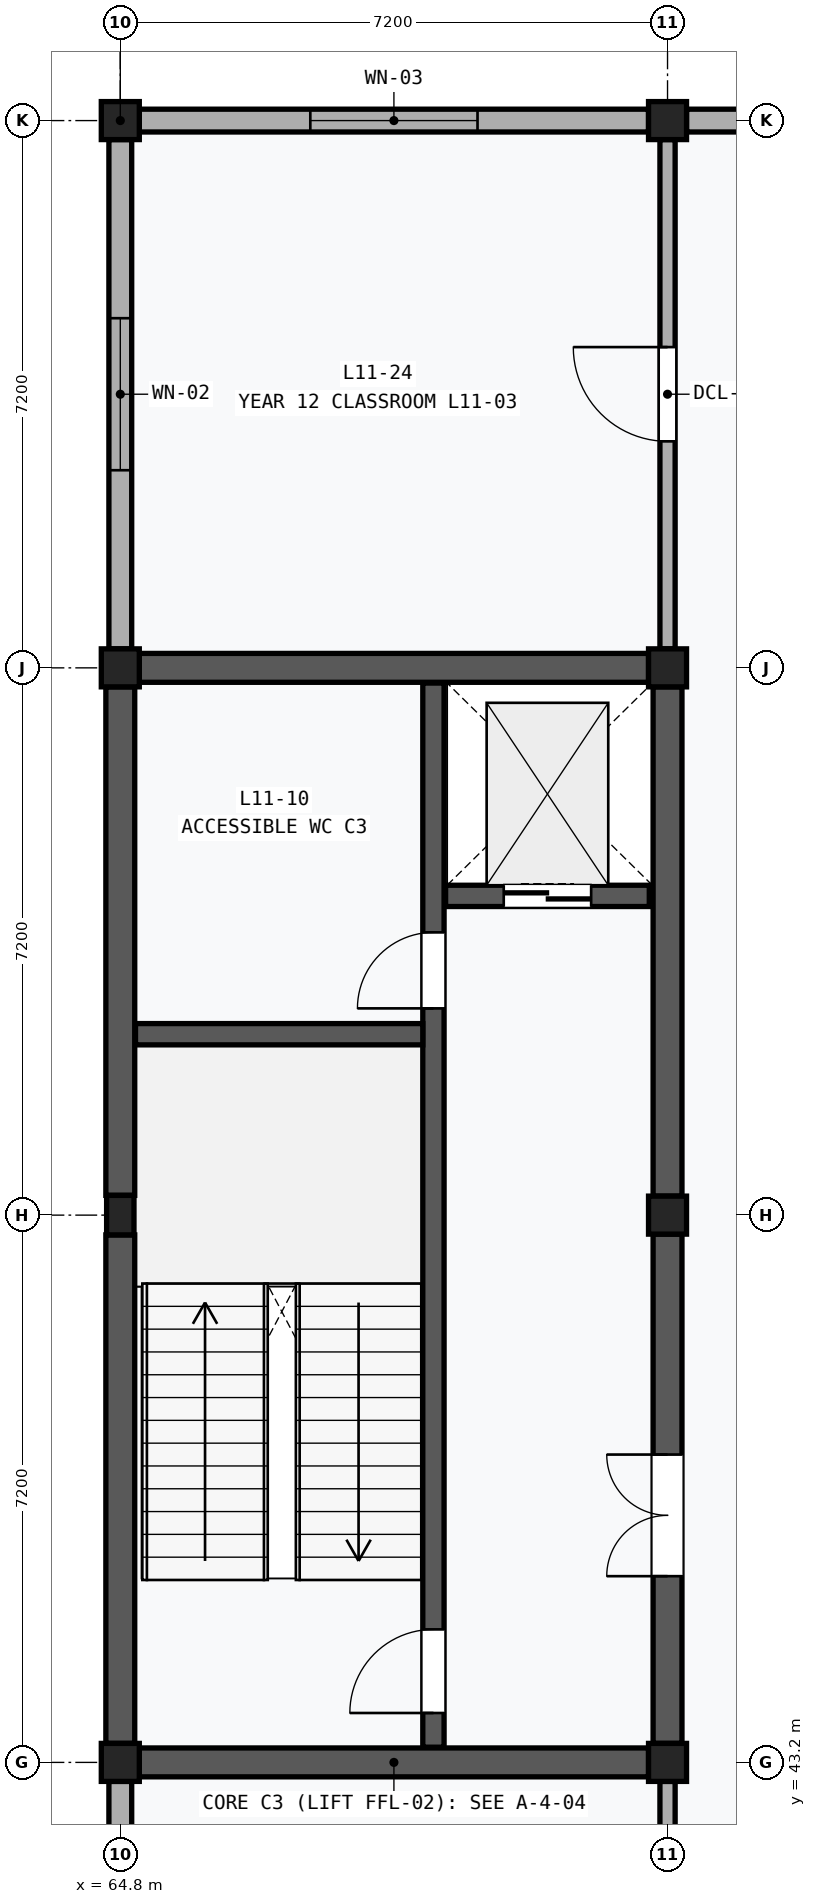
"""IFC4 building model, lengths in metres.
Left out: names, types, materials, properties, quantities, classifications, styles, units other than length and angle.
Written with IfcOpenShell. Run it as: python <this file> out.ifc"""

import sys

from ifc_helpers import new_model, si_unit, direction, frame, frame_2d, origin, origin_2d, place, context, subcontext, project, spatial, rectangle, extrude, element, fill, save


model = new_model("IFC4")
c1 = context("Model", 3, precision=1e-05, world=origin(), true_north=direction((0.0, 1.0)))
c2 = subcontext(c1, "Body", "Model", "MODEL_VIEW")
j1 = project(units=[si_unit("LENGTHUNIT", "METRE"), si_unit("PLANEANGLEUNIT", "RADIAN")], contexts=[c1])
p1 = place(None, origin())
s1 = spatial("IfcSite", under=j1, at=p1, CompositionType="ELEMENT")
p2 = place(p1, origin())
s2 = spatial("IfcBuilding", under=s1, at=p2, CompositionType="ELEMENT")
p3 = place(p2, frame((0.0, 0.0, 46.8)))
s3 = spatial("IfcBuildingStorey", under=s2, at=p3, CompositionType="ELEMENT", Elevation=46.8)
p4 = place(p3, frame((64.8, 43.2, 0.0), z_axis=(0.0, 0.0, 1.0), x_axis=(1.0, 0.0, 0.0)))
e1 = element("IfcColumn", 1, at=p4, inside=s3, PredefinedType="COLUMN", context=c2, shape_type="SweptSolid", body=[
    extrude(rectangle(XDim=0.5, YDim=0.5, at=origin_2d()), origin(), (0.0, 0.0, 1.0), 4.2),
])
p5 = place(p3, frame((64.8, 50.4, 0.0), z_axis=(0.0, 0.0, 1.0), x_axis=(1.0, 0.0, 0.0)))
e2 = element("IfcColumn", 2, at=p5, inside=s3, PredefinedType="PILASTER", context=c2, shape_type="SweptSolid", body=[
    extrude(rectangle(XDim=0.36, YDim=0.52, at=origin_2d()), origin(), (0.0, 0.0, 1.0), 4.2),
])
for number, where, z_axis, x_axis in (
    (3, (64.8, 57.6, 0.0), (0.0, 0.0, 1.0), (1.0, 0.0, 0.0)),
    (4, (64.8, 64.8, 0.0), (0.0, 0.0, 1.0), (1.0, 0.0, 0.0)),
    (5, (72.0, 43.2, 0.0), (0.0, 0.0, 1.0), (1.0, 0.0, 0.0)),
    (6, (72.0, 50.4, 0.0), (0.0, 0.0, 1.0), (1.0, 0.0, 0.0)),
    (7, (72.0, 57.6, 0.0), (0.0, 0.0, 1.0), (1.0, 0.0, 0.0)),
    (8, (72.0, 64.8, 0.0), (0.0, 0.0, 1.0), (1.0, 0.0, 0.0)),
):
    element("IfcColumn", number, at=place(p3, frame(where, z_axis=z_axis, x_axis=x_axis)), inside=s3, PredefinedType="COLUMN", context=c2, shape_type="SweptSolid", body=[
        extrude(rectangle(XDim=0.5, YDim=0.5, at=origin_2d()), origin(), (0.0, 0.0, 1.0), 4.2),
    ])
p6 = place(p3, frame((64.8, 36.25, 0.0), z_axis=(0.0, 0.0, 1.0), x_axis=(0.0, 1.0, 0.0)))
e9 = element("IfcWall", 9, at=p6, inside=s3, PredefinedType="SOLIDWALL", context=c2, shape_type="SweptSolid", body=[
    extrude(rectangle(XDim=6.7, YDim=0.3, at=frame_2d((3.35, 0.0))), origin(), (0.0, 0.0, 1.0), 3.37),
])
p7 = place(p3, frame((65.05, 64.8, 0.0), z_axis=(0.0, 0.0, 1.0), x_axis=(1.0, 0.0, 0.0)))
e10 = element("IfcWall", 10, at=p7, inside=s3, PredefinedType="SOLIDWALL", context=c2, shape_type="SweptSolid", body=[
    extrude(rectangle(XDim=6.7, YDim=0.3, at=frame_2d((3.35, 0.0))), origin(), (0.0, 0.0, 1.0), 3.37),
])
p8 = place(p7, frame((2.25, 0.0, 0.9)))
e11 = element("IfcOpeningElement", 11, at=p8, cuts=e10, PredefinedType="OPENING", context=c2, shape_type="SweptSolid", body=[
    extrude(rectangle(XDim=2.2, YDim=1.8, at=frame_2d((1.1, 0.9))), frame((0.0, 0.162, 0.0), z_axis=(0.0, -1.0, 0.0), x_axis=(1.0, 0.0, 0.0)), (0.0, 0.0, 1.0), 0.324),
])
p9 = place(p3, frame((64.8, 57.85, 0.0), z_axis=(0.0, 0.0, 1.0), x_axis=(0.0, 1.0, 0.0)))
e12 = element("IfcWall", 12, at=p9, inside=s3, PredefinedType="SOLIDWALL", context=c2, shape_type="SweptSolid", body=[
    extrude(rectangle(XDim=6.7, YDim=0.3, at=frame_2d((3.35, 0.0))), origin(), (0.0, 0.0, 1.0), 3.37),
])
p10 = place(p9, frame((2.35, 0.0, 0.9)))
e13 = element("IfcOpeningElement", 13, at=p10, cuts=e12, PredefinedType="OPENING", context=c2, shape_type="SweptSolid", body=[
    extrude(rectangle(XDim=2.0, YDim=1.8, at=frame_2d((1.0, 0.9))), frame((0.0, 0.162, 0.0), z_axis=(0.0, -1.0, 0.0), x_axis=(1.0, 0.0, 0.0)), (0.0, 0.0, 1.0), 0.324),
])
p11 = place(p3, frame((72.25, 64.8, 0.0), z_axis=(0.0, 0.0, 1.0), x_axis=(1.0, 0.0, 0.0)))
e14 = element("IfcWall", 14, at=p11, inside=s3, PredefinedType="SOLIDWALL", context=c2, shape_type="SweptSolid", body=[
    extrude(rectangle(XDim=6.77, YDim=0.3, at=frame_2d((3.385, 0.0))), origin(), (0.0, 0.0, 1.0), 3.37),
])
p12 = place(p11, frame((2.185, 0.0, 0.9)))
e15 = element("IfcOpeningElement", 15, at=p12, cuts=e14, PredefinedType="OPENING", context=c2, shape_type="SweptSolid", body=[
    extrude(rectangle(XDim=2.4, YDim=1.8, at=frame_2d((1.2, 0.9))), frame((0.0, 0.162, 0.0), z_axis=(0.0, -1.0, 0.0), x_axis=(1.0, 0.0, 0.0)), (0.0, 0.0, 1.0), 0.324),
])
p13 = place(p3, frame((64.8, 43.45, 0.0), z_axis=(0.0, 0.0, 1.0), x_axis=(0.0, 1.0, 0.0)))
e16 = element("IfcWall", 16, at=p13, inside=s3, PredefinedType="SHEAR", context=c2, shape_type="SweptSolid", body=[
    extrude(rectangle(XDim=6.69, YDim=0.38, at=frame_2d((3.345, 0.0))), origin(), (0.0, 0.0, 1.0), 3.37),
])
p14 = place(p3, frame((64.8, 50.66, 0.0), z_axis=(0.0, 0.0, 1.0), x_axis=(0.0, 1.0, 0.0)))
e17 = element("IfcWall", 17, at=p14, inside=s3, PredefinedType="SHEAR", context=c2, shape_type="SweptSolid", body=[
    extrude(rectangle(XDim=6.69, YDim=0.38, at=frame_2d((3.345, 0.0))), origin(), (0.0, 0.0, 1.0), 3.37),
])
p15 = place(p3, frame((72.0, 43.45, 0.0), z_axis=(0.0, 0.0, 1.0), x_axis=(0.0, 1.0, 0.0)))
e18 = element("IfcWall", 18, at=p15, inside=s3, PredefinedType="SHEAR", context=c2, shape_type="SweptSolid", body=[
    extrude(rectangle(XDim=6.7, YDim=0.38, at=frame_2d((3.35, 0.0))), origin(), (0.0, 0.0, 1.0), 3.29),
])
p16 = place(p15, frame((2.2, 0.0, 0.0)))
e19 = element("IfcOpeningElement", 19, at=p16, cuts=e18, PredefinedType="OPENING", context=c2, shape_type="SweptSolid", body=[
    extrude(rectangle(XDim=1.6, YDim=2.2, at=frame_2d((0.8, 1.1))), frame((0.0, 0.202, 0.0), z_axis=(0.0, -1.0, 0.0), x_axis=(1.0, 0.0, 0.0)), (0.0, 0.0, 1.0), 0.404),
])
p17 = place(p3, frame((72.0, 50.65, 0.0), z_axis=(0.0, 0.0, 1.0), x_axis=(0.0, 1.0, 0.0)))
e20 = element("IfcWall", 20, at=p17, inside=s3, PredefinedType="SHEAR", context=c2, shape_type="SweptSolid", body=[
    extrude(rectangle(XDim=6.7, YDim=0.38, at=frame_2d((3.35, 0.0))), origin(), (0.0, 0.0, 1.0), 3.29),
])
for number, where, z_axis, x_axis in (
    (21, (65.05, 43.2, 0.0), (0.0, 0.0, 1.0), (1.0, 0.0, 0.0)),
    (22, (65.05, 57.6, 0.0), (0.0, 0.0, 1.0), (1.0, 0.0, 0.0)),
):
    element("IfcWall", number, at=place(p3, frame(where, z_axis=z_axis, x_axis=x_axis)), inside=s3, PredefinedType="SHEAR", context=c2, shape_type="SweptSolid", body=[
        extrude(rectangle(XDim=6.7, YDim=0.38, at=frame_2d((3.35, 0.0))), origin(), (0.0, 0.0, 1.0), 3.29),
    ])
p18 = place(p3, frame((68.92, 43.4, 0.0), z_axis=(0.0, 0.0, 1.0), x_axis=(0.0, 1.0, 0.0)))
e23 = element("IfcWall", 23, at=p18, inside=s3, PredefinedType="SHEAR", context=c2, shape_type="SweptSolid", body=[
    extrude(rectangle(XDim=14.0, YDim=0.28, at=frame_2d((7.0, 0.0))), origin(), (0.0, 0.0, 1.0), 3.97),
])
p19 = place(p18, frame((0.45, 0.0, 0.0)))
e24 = element("IfcOpeningElement", 24, at=p19, cuts=e23, PredefinedType="OPENING", context=c2, shape_type="SweptSolid", body=[
    extrude(rectangle(XDim=1.1, YDim=2.15, at=frame_2d((0.55, 1.075))), frame((0.0, 0.152, 0.0), z_axis=(0.0, -1.0, 0.0), x_axis=(1.0, 0.0, 0.0)), (0.0, 0.0, 1.0), 0.304),
])
p20 = place(p18, frame((9.72, 0.0, 0.0)))
e25 = element("IfcOpeningElement", 25, at=p20, cuts=e23, PredefinedType="OPENING", context=c2, shape_type="SweptSolid", body=[
    extrude(rectangle(XDim=1.0, YDim=2.15, at=frame_2d((0.5, 1.075))), frame((0.0, 0.152, 0.0), z_axis=(0.0, -1.0, 0.0), x_axis=(1.0, 0.0, 0.0)), (0.0, 0.0, 1.0), 0.304),
])
p21 = place(p3, frame((65.0, 52.78, 0.0), z_axis=(0.0, 0.0, 1.0), x_axis=(1.0, 0.0, 0.0)))
e26 = element("IfcWall", 26, at=p21, inside=s3, PredefinedType="SHEAR", context=c2, shape_type="SweptSolid", body=[
    extrude(rectangle(XDim=3.78, YDim=0.28, at=frame_2d((1.89, 0.0))), origin(), (0.0, 0.0, 1.0), 3.97),
])
p22 = place(p3, frame((69.08, 54.6, 0.0), z_axis=(0.0, 0.0, 1.0), x_axis=(1.0, 0.0, 0.0)))
e27 = element("IfcWall", 27, at=p22, inside=s3, PredefinedType="SHEAR", context=c2, shape_type="SweptSolid", body=[
    extrude(rectangle(XDim=2.68, YDim=0.28, at=frame_2d((1.34, 0.0))), origin(), (0.0, 0.0, 1.0), 3.97),
])
p23 = place(p22, frame((0.765, 0.0, 0.0)))
e28 = element("IfcOpeningElement", 28, at=p23, cuts=e27, PredefinedType="OPENING", context=c2, shape_type="SweptSolid", body=[
    extrude(rectangle(XDim=1.15, YDim=2.2, at=frame_2d((0.575, 1.1))), frame((0.0, 0.152, 0.0), z_axis=(0.0, -1.0, 0.0), x_axis=(1.0, 0.0, 0.0)), (0.0, 0.0, 1.0), 0.304),
])
p24 = place(p3, frame((72.0, 36.25, 0.0), z_axis=(0.0, 0.0, 1.0), x_axis=(0.0, 1.0, 0.0)))
e29 = element("IfcWall", 29, at=p24, inside=s3, PredefinedType="PARTITIONING", context=c2, shape_type="SweptSolid", body=[
    extrude(rectangle(XDim=6.7, YDim=0.2, at=frame_2d((3.35, 0.0))), origin(), (0.0, 0.0, 1.0), 3.29),
])
p25 = place(p24, frame((2.75, 0.0, 0.0)))
e30 = element("IfcOpeningElement", 30, at=p25, cuts=e29, PredefinedType="OPENING", context=c2, shape_type="SweptSolid", body=[
    extrude(rectangle(XDim=1.2, YDim=2.24, at=frame_2d((0.6, 1.12))), frame((0.0, 0.112, 0.0), z_axis=(0.0, -1.0, 0.0), x_axis=(1.0, 0.0, 0.0)), (0.0, 0.0, 1.0), 0.224),
])
p26 = place(p3, frame((72.0, 57.85, 0.0), z_axis=(0.0, 0.0, 1.0), x_axis=(0.0, 1.0, 0.0)))
e31 = element("IfcWall", 31, at=p26, inside=s3, PredefinedType="PARTITIONING", context=c2, shape_type="SweptSolid", body=[
    extrude(rectangle(XDim=6.7, YDim=0.2, at=frame_2d((3.35, 0.0))), origin(), (0.0, 0.0, 1.0), 3.29),
])
p27 = place(p26, frame((2.73, 0.0, 0.0)))
e32 = element("IfcOpeningElement", 32, at=p27, cuts=e31, PredefinedType="OPENING", context=c2, shape_type="SweptSolid", body=[
    extrude(rectangle(XDim=1.24, YDim=2.26, at=frame_2d((0.62, 1.13))), frame((0.0, 0.112, 0.0), z_axis=(0.0, -1.0, 0.0), x_axis=(1.0, 0.0, 0.0)), (0.0, 0.0, 1.0), 0.224),
])
p28 = place(p8, origin())
e33 = element("IfcWindow", 33, at=p28, inside=s3, PartitioningType="SINGLE_PANEL", PredefinedType="WINDOW", context=c2, shape_type="SweptSolid", body=[
    extrude(rectangle(XDim=2.2, YDim=1.8, at=frame_2d((1.1, 0.9))), frame((0.0, 0.03, 0.0), z_axis=(0.0, -1.0, 0.0), x_axis=(1.0, 0.0, 0.0)), (0.0, 0.0, 1.0), 0.06),
])
fill(e11, e33)
p29 = place(p10, origin())
e34 = element("IfcWindow", 34, at=p29, inside=s3, PartitioningType="SINGLE_PANEL", PredefinedType="WINDOW", context=c2, shape_type="SweptSolid", body=[
    extrude(rectangle(XDim=2.0, YDim=1.8, at=frame_2d((1.0, 0.9))), frame((0.0, 0.03, 0.0), z_axis=(0.0, -1.0, 0.0), x_axis=(1.0, 0.0, 0.0)), (0.0, 0.0, 1.0), 0.06),
])
fill(e13, e34)
p30 = place(p16, origin())
e35 = element("IfcDoor", 35, at=p30, inside=s3, OperationType="DOUBLE_DOOR_SINGLE_SWING", PredefinedType="DOOR", context=c2, shape_type="SweptSolid", body=[
    extrude(rectangle(XDim=1.6, YDim=2.2, at=frame_2d((0.8, 1.1))), frame((0.0, 0.025, 0.0), z_axis=(0.0, -1.0, 0.0), x_axis=(1.0, 0.0, 0.0)), (0.0, 0.0, 1.0), 0.05),
])
fill(e19, e35)
p31 = place(p19, origin())
e36 = element("IfcDoor", 36, at=p31, inside=s3, OperationType="SINGLE_SWING_LEFT", PredefinedType="DOOR", context=c2, shape_type="SweptSolid", body=[
    extrude(rectangle(XDim=1.1, YDim=2.15, at=frame_2d((0.55, 1.075))), frame((0.0, 0.025, 0.0), z_axis=(0.0, -1.0, 0.0), x_axis=(1.0, 0.0, 0.0)), (0.0, 0.0, 1.0), 0.05),
])
fill(e24, e36)
p32 = place(p20, origin())
e37 = element("IfcDoor", 37, at=p32, inside=s3, OperationType="SINGLE_SWING_LEFT", PredefinedType="DOOR", context=c2, shape_type="SweptSolid", body=[
    extrude(rectangle(XDim=1.0, YDim=2.15, at=frame_2d((0.5, 1.075))), frame((0.0, 0.025, 0.0), z_axis=(0.0, -1.0, 0.0), x_axis=(1.0, 0.0, 0.0)), (0.0, 0.0, 1.0), 0.05),
])
fill(e25, e37)
p33 = place(p23, frame((1.15, 0.0, 0.0), z_axis=(0.0, 0.0, 1.0), x_axis=(-1.0, 0.0, 0.0)))
e38 = element("IfcDoor", 38, at=p33, inside=s3, OperationType="DOUBLE_DOOR_SLIDING", PredefinedType="DOOR", context=c2, shape_type="SweptSolid", body=[
    extrude(rectangle(XDim=1.15, YDim=2.2, at=frame_2d((0.575, 1.1))), frame((0.0, 0.025, 0.0), z_axis=(0.0, -1.0, 0.0), x_axis=(1.0, 0.0, 0.0)), (0.0, 0.0, 1.0), 0.05),
])
fill(e28, e38)
p34 = place(p27, origin())
e39 = element("IfcDoor", 39, at=p34, inside=s3, OperationType="SINGLE_SWING_RIGHT", PredefinedType="DOOR", context=c2, shape_type="SweptSolid", body=[
    extrude(rectangle(XDim=1.24, YDim=2.26, at=frame_2d((0.62, 1.13))), frame((0.0, 0.025, 0.0), z_axis=(0.0, -1.0, 0.0), x_axis=(1.0, 0.0, 0.0)), (0.0, 0.0, 1.0), 0.05),
])
fill(e32, e39)
save(model, sys.argv[1])
